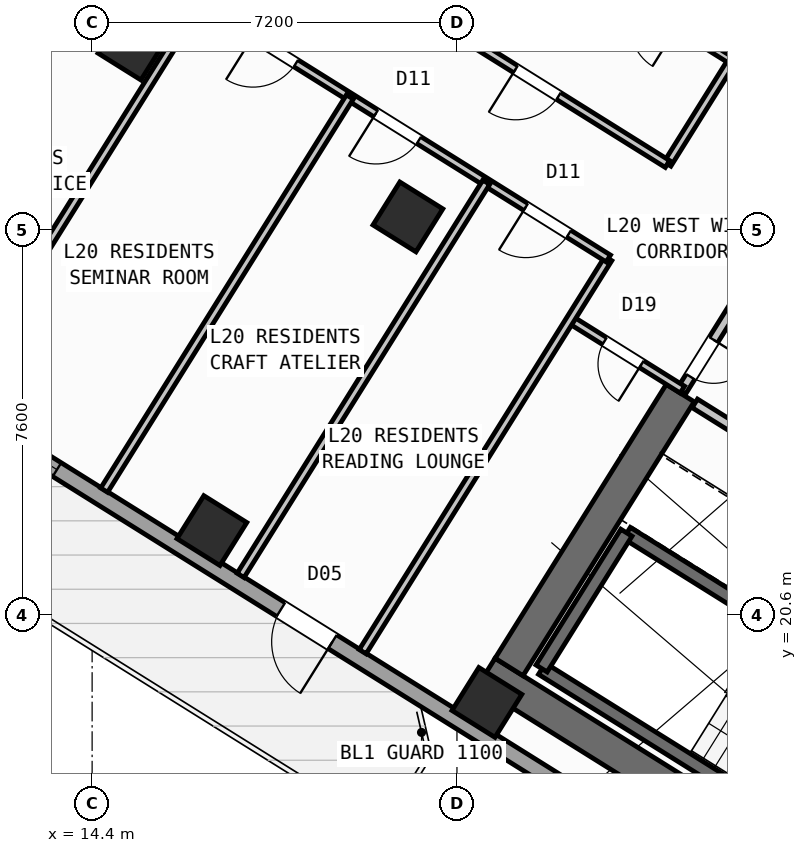
"""IFC4 building model, lengths in metres.
Left out: names, types, materials, properties, quantities, classifications, styles, units other than length and angle.
Written with IfcOpenShell. Run it as: python <this file> out.ifc"""

import sys

from ifc_helpers import new_model, si_unit, direction, frame, frame_2d, origin, origin_2d, place, context, subcontext, project, spatial, rectangle, hollow_rectangle, extrude, source, transform, mapped, element, fill, save


model = new_model("IFC4")
c1 = context("Model", 3, precision=1e-05, world=origin(), true_north=direction((0.0, 1.0)))
c2 = subcontext(c1, "Body", "Model", "MODEL_VIEW")
j1 = project(units=[si_unit("LENGTHUNIT", "METRE"), si_unit("PLANEANGLEUNIT", "RADIAN")], contexts=[c1])
p1 = place(None, origin())
s1 = spatial("IfcSite", under=j1, at=p1, CompositionType="ELEMENT")
p2 = place(p1, origin())
s2 = spatial("IfcBuilding", under=s1, at=p2, CompositionType="ELEMENT")
p3 = place(p2, frame((0.0, 0.0, 81.0)))
s3 = spatial("IfcBuildingStorey", under=s2, at=p3, CompositionType="ELEMENT", Elevation=81.0)
p4 = place(p3, frame((33.409, 12.45, 0.0), z_axis=(0.0, 0.0, 1.0), x_axis=(-0.848051132073, 0.529914405721, 0.0)))
e1 = element("IfcWall", 1, at=p4, inside=s3, PredefinedType="SHEAR", context=c2, shape_type="SweptSolid", body=[
    extrude(rectangle(XDim=13.24, YDim=0.65, at=frame_2d((6.62, 0.0))), origin(), (0.0, 0.0, 1.0), 3.32),
])
p5 = place(p3, frame((26.007, 24.976, 0.0), z_axis=(0.0, 0.0, 1.0), x_axis=(-0.529916319127, -0.848049936456, 0.0)))
e2 = element("IfcWall", 2, at=p5, inside=s3, PredefinedType="SHEAR", context=c2, shape_type="SweptSolid", body=[
    extrude(rectangle(XDim=6.375, YDim=0.65, at=frame_2d((3.188, 0.0))), origin(), (0.0, 0.0, 1.0), 3.32),
])
m1 = source(origin(), c2, "Body", "SweptSolid", [
    extrude(hollow_rectangle(XDim=1.0, YDim=1.0, WallThickness=0.04, at=origin_2d()), origin(), (0.0, 0.0, 1.0), 3.6),
])
for number, where, z_axis, x_axis in (
    (3, (22.191, 18.87, 0.0), (0.0, 0.0, 1.0), (-0.848, 0.53, 0.0)),
    (4, (20.632, 28.452, 0.0), (0.0, 0.0, 1.0), (-0.848, 0.53, 0.0)),
    (5, (16.764, 22.261, 0.0), (0.0, 0.0, 1.0), (-0.848, 0.53, 0.0)),
    (6, (15.205, 31.844, 0.0), (0.0, 0.0, 1.0), (-0.848, 0.53, 0.0)),
):
    element("IfcColumn", number, at=place(p3, frame(where, z_axis=z_axis, x_axis=x_axis)), inside=s3, PredefinedType="COLUMN", context=c2, shape_type="MappedRepresentation", body=[
        mapped(m1, transform((0.0, 0.0, 0.0), scale=1.0)),
    ])
p6 = place(p3, frame((31.76, 12.183, 0.0), z_axis=(0.0, 0.0, 1.0), x_axis=(-0.848047074256, 0.529920899612, 0.0)))
e7 = element("IfcWall", 7, at=p6, inside=s3, PredefinedType="STANDARD", context=c2, shape_type="SweptSolid", body=[
    extrude(rectangle(XDim=30.652, YDim=0.32, at=frame_2d((15.326, 0.0))), origin(), (0.0, 0.0, 1.0), 3.32),
])
p7 = place(p6, frame((14.878, 0.0, 0.0)))
e8 = element("IfcOpeningElement", 8, at=p7, cuts=e7, PredefinedType="OPENING", context=c2, shape_type="SweptSolid", body=[
    extrude(rectangle(XDim=1.2, YDim=2.15, at=frame_2d((0.6, 1.075))), frame((0.0, 0.17, 0.0), z_axis=(0.0, -1.0, 0.0), x_axis=(1.0, 0.0, 0.0)), (0.0, 0.0, 1.0), 0.34),
])
p8 = place(p6, frame((1.99, 0.0, 0.8)))
e9 = element("IfcOpeningElement", 9, at=p8, cuts=e7, PredefinedType="OPENING", context=c2, shape_type="SweptSolid", body=[
    extrude(rectangle(XDim=2.1, YDim=1.55, at=frame_2d((1.05, 0.775))), frame((0.0, 0.17, 0.0), z_axis=(0.0, -1.0, 0.0), x_axis=(1.0, 0.0, 0.0)), (0.0, 0.0, 1.0), 0.34),
])
p9 = place(p6, frame((7.169, 0.0, 0.8)))
e10 = element("IfcOpeningElement", 10, at=p9, cuts=e7, PredefinedType="OPENING", context=c2, shape_type="SweptSolid", body=[
    extrude(rectangle(XDim=2.1, YDim=1.55, at=frame_2d((1.05, 0.775))), frame((0.0, 0.17, 0.0), z_axis=(0.0, -1.0, 0.0), x_axis=(1.0, 0.0, 0.0)), (0.0, 0.0, 1.0), 0.34),
])
p10 = place(p6, frame((21.289, 0.0, 0.85)))
e11 = element("IfcOpeningElement", 11, at=p10, cuts=e7, PredefinedType="OPENING", context=c2, shape_type="SweptSolid", body=[
    extrude(rectangle(XDim=1.5, YDim=1.5, at=frame_2d((0.75, 0.75))), frame((0.0, 0.17, 0.0), z_axis=(0.0, -1.0, 0.0), x_axis=(1.0, 0.0, 0.0)), (0.0, 0.0, 1.0), 0.34),
])
p11 = place(p6, frame((25.59, 0.0, 1.0)))
e12 = element("IfcOpeningElement", 12, at=p11, cuts=e7, PredefinedType="OPENING", context=c2, shape_type="SweptSolid", body=[
    extrude(rectangle(XDim=0.9, YDim=1.25, at=frame_2d((0.45, 0.625))), frame((0.0, 0.17, 0.0), z_axis=(0.0, -1.0, 0.0), x_axis=(1.0, 0.0, 0.0)), (0.0, 0.0, 1.0), 0.34),
])
p12 = place(p6, frame((28.47, 0.0, 1.0)))
e13 = element("IfcOpeningElement", 13, at=p12, cuts=e7, PredefinedType="OPENING", context=c2, shape_type="SweptSolid", body=[
    extrude(rectangle(XDim=0.9, YDim=1.25, at=frame_2d((0.45, 0.625))), frame((0.0, 0.17, 0.0), z_axis=(0.0, -1.0, 0.0), x_axis=(1.0, 0.0, 0.0)), (0.0, 0.0, 1.0), 0.34),
])
p13 = place(p3, frame((5.7, 28.71, 0.0), z_axis=(0.0, 0.0, 1.0), x_axis=(0.529923711467, 0.8480453172, 0.0)))
e14 = element("IfcWall", 14, at=p13, inside=s3, PredefinedType="STANDARD", context=c2, shape_type="SweptSolid", body=[
    extrude(rectangle(XDim=21.587, YDim=0.32, at=frame_2d((10.794, 0.0))), origin(), (0.0, 0.0, 1.0), 2.745),
])
p14 = place(p13, frame((2.994, 0.0, 0.8)))
e15 = element("IfcOpeningElement", 15, at=p14, cuts=e14, PredefinedType="OPENING", context=c2, shape_type="SweptSolid", body=[
    extrude(rectangle(XDim=2.1, YDim=1.55, at=frame_2d((1.05, 0.775))), frame((0.0, 0.17, 0.0), z_axis=(0.0, -1.0, 0.0), x_axis=(1.0, 0.0, 0.0)), (0.0, 0.0, 1.0), 0.34),
])
p15 = place(p13, frame((12.049, 0.0, 1.0)))
e16 = element("IfcOpeningElement", 16, at=p15, cuts=e14, PredefinedType="OPENING", context=c2, shape_type="SweptSolid", body=[
    extrude(rectangle(XDim=0.9, YDim=1.25, at=frame_2d((0.45, 0.625))), frame((0.0, 0.17, 0.0), z_axis=(0.0, -1.0, 0.0), x_axis=(1.0, 0.0, 0.0)), (0.0, 0.0, 1.0), 0.34),
])
p16 = place(p13, frame((17.431, 0.0, 0.85)))
e17 = element("IfcOpeningElement", 17, at=p16, cuts=e14, PredefinedType="OPENING", context=c2, shape_type="SweptSolid", body=[
    extrude(rectangle(XDim=1.5, YDim=1.5, at=frame_2d((0.75, 0.75))), frame((0.0, 0.17, 0.0), z_axis=(0.0, -1.0, 0.0), x_axis=(1.0, 0.0, 0.0)), (0.0, 0.0, 1.0), 0.34),
])
p17 = place(p3, frame((17.424, 47.083, 0.0), z_axis=(0.0, 0.0, 1.0), x_axis=(0.848049927979, -0.529916332693, 0.0)))
e18 = element("IfcWall", 18, at=p17, inside=s3, PredefinedType="STANDARD", context=c2, shape_type="SweptSolid", body=[
    extrude(rectangle(XDim=29.223, YDim=0.32, at=frame_2d((14.612, 0.0))), origin(), (0.0, 0.0, 1.0), 3.32),
])
p18 = place(p17, frame((3.709, 0.0, 0.0)))
e19 = element("IfcOpeningElement", 19, at=p18, cuts=e18, PredefinedType="OPENING", context=c2, shape_type="SweptSolid", body=[
    extrude(rectangle(XDim=1.05, YDim=2.15, at=frame_2d((0.525, 1.075))), frame((0.0, 0.17, 0.0), z_axis=(0.0, -1.0, 0.0), x_axis=(1.0, 0.0, 0.0)), (0.0, 0.0, 1.0), 0.34),
])
p19 = place(p17, frame((0.659, 0.0, 0.95)))
e20 = element("IfcOpeningElement", 20, at=p19, cuts=e18, PredefinedType="OPENING", context=c2, shape_type="SweptSolid", body=[
    extrude(rectangle(XDim=1.2, YDim=1.4, at=frame_2d((0.6, 0.7))), frame((0.0, 0.17, 0.0), z_axis=(0.0, -1.0, 0.0), x_axis=(1.0, 0.0, 0.0)), (0.0, 0.0, 1.0), 0.34),
])
p20 = place(p17, frame((7.369, 0.0, 0.85)))
e21 = element("IfcOpeningElement", 21, at=p20, cuts=e18, PredefinedType="OPENING", context=c2, shape_type="SweptSolid", body=[
    extrude(rectangle(XDim=1.8, YDim=1.5, at=frame_2d((0.9, 0.75))), frame((0.0, 0.17, 0.0), z_axis=(0.0, -1.0, 0.0), x_axis=(1.0, 0.0, 0.0)), (0.0, 0.0, 1.0), 0.34),
])
p21 = place(p17, frame((11.009, 0.0, 1.0)))
e22 = element("IfcOpeningElement", 22, at=p21, cuts=e18, PredefinedType="OPENING", context=c2, shape_type="SweptSolid", body=[
    extrude(rectangle(XDim=0.9, YDim=1.25, at=frame_2d((0.45, 0.625))), frame((0.0, 0.17, 0.0), z_axis=(0.0, -1.0, 0.0), x_axis=(1.0, 0.0, 0.0)), (0.0, 0.0, 1.0), 0.34),
])
p22 = place(p17, frame((13.874, 0.0, 0.95)))
e23 = element("IfcOpeningElement", 23, at=p22, cuts=e18, PredefinedType="OPENING", context=c2, shape_type="SweptSolid", body=[
    extrude(rectangle(XDim=1.2, YDim=1.4, at=frame_2d((0.6, 0.7))), frame((0.0, 0.17, 0.0), z_axis=(0.0, -1.0, 0.0), x_axis=(1.0, 0.0, 0.0)), (0.0, 0.0, 1.0), 0.34),
])
p23 = place(p17, frame((17.254, 0.0, 1.0)))
e24 = element("IfcOpeningElement", 24, at=p23, cuts=e18, PredefinedType="OPENING", context=c2, shape_type="SweptSolid", body=[
    extrude(rectangle(XDim=0.9, YDim=1.25, at=frame_2d((0.45, 0.625))), frame((0.0, 0.17, 0.0), z_axis=(0.0, -1.0, 0.0), x_axis=(1.0, 0.0, 0.0)), (0.0, 0.0, 1.0), 0.34),
])
p24 = place(p17, frame((20.764, 0.0, 0.8)))
e25 = element("IfcOpeningElement", 25, at=p24, cuts=e18, PredefinedType="OPENING", context=c2, shape_type="SweptSolid", body=[
    extrude(rectangle(XDim=2.1, YDim=1.55, at=frame_2d((1.05, 0.775))), frame((0.0, 0.17, 0.0), z_axis=(0.0, -1.0, 0.0), x_axis=(1.0, 0.0, 0.0)), (0.0, 0.0, 1.0), 0.34),
])
p25 = place(p17, frame((25.403, 0.0, 0.8)))
e26 = element("IfcOpeningElement", 26, at=p25, cuts=e18, PredefinedType="OPENING", context=c2, shape_type="SweptSolid", body=[
    extrude(rectangle(XDim=2.1, YDim=1.55, at=frame_2d((1.05, 0.775))), frame((0.0, 0.17, 0.0), z_axis=(0.0, -1.0, 0.0), x_axis=(1.0, 0.0, 0.0)), (0.0, 0.0, 1.0), 0.34),
])
p26 = place(p3, frame((29.605, 15.581, 0.0), z_axis=(0.0, 0.0, 1.0), x_axis=(-0.848036911448, 0.529937163087, 0.0)))
e27 = element("IfcWall", 27, at=p26, inside=s3, PredefinedType="SHEAR", context=c2, shape_type="SweptSolid", body=[
    extrude(rectangle(XDim=7.46, YDim=0.26, at=frame_2d((3.73, 0.0))), origin(), (0.0, 0.0, 1.0), 3.32),
])
p27 = place(p3, frame((31.28, 18.261, 0.0), z_axis=(0.0, 0.0, 1.0), x_axis=(-0.848051618787, 0.529913626805, 0.0)))
e28 = element("IfcWall", 28, at=p27, inside=s3, PredefinedType="SHEAR", context=c2, shape_type="SweptSolid", body=[
    extrude(rectangle(XDim=7.46, YDim=0.26, at=frame_2d((3.73, 0.0))), origin(), (0.0, 0.0, 1.0), 3.32),
])
p28 = place(p27, frame((0.36, 0.0, 0.0)))
e29 = element("IfcOpeningElement", 29, at=p28, cuts=e28, PredefinedType="OPENING", context=c2, shape_type="SweptSolid", body=[
    extrude(rectangle(XDim=0.86, YDim=2.05, at=frame_2d((0.43, 1.025))), frame((0.0, 0.14, 0.0), z_axis=(0.0, -1.0, 0.0), x_axis=(1.0, 0.0, 0.0)), (0.0, 0.0, 1.0), 0.28),
])
p29 = place(p3, frame((24.945, 22.22, 0.0), z_axis=(0.0, 0.0, 1.0), x_axis=(-0.529908658664, -0.84805472316, 0.0)))
e30 = element("IfcWall", 30, at=p29, inside=s3, PredefinedType="SHEAR", context=c2, shape_type="SweptSolid", body=[
    extrude(rectangle(XDim=3.16, YDim=0.26, at=frame_2d((1.58, 0.0))), origin(), (0.0, 0.0, 1.0), 3.32),
])
p30 = place(p3, frame((31.525, 21.504, 0.0), z_axis=(0.0, 0.0, 1.0), x_axis=(-0.848044998614, 0.529924221305, 0.0)))
e31 = element("IfcWall", 31, at=p30, inside=s3, PredefinedType="STANDARD", context=c2, shape_type="SweptSolid", body=[
    extrude(rectangle(XDim=6.168, YDim=0.2, at=frame_2d((3.084, 0.0))), origin(), (0.0, 0.0, 1.0), 3.31),
])
p31 = place(p30, frame((4.4, 0.0, 0.0)))
e32 = element("IfcOpeningElement", 32, at=p31, cuts=e31, PredefinedType="OPENING", context=c2, shape_type="SweptSolid", body=[
    extrude(rectangle(XDim=0.86, YDim=2.05, at=frame_2d((0.43, 1.025))), frame((0.0, 0.11, 0.0), z_axis=(0.0, -1.0, 0.0), x_axis=(1.0, 0.0, 0.0)), (0.0, 0.0, 1.0), 0.22),
])
p32 = place(p30, frame((1.45, 0.0, 0.0)))
e33 = element("IfcOpeningElement", 33, at=p32, cuts=e31, PredefinedType="OPENING", context=c2, shape_type="SweptSolid", body=[
    extrude(rectangle(XDim=0.86, YDim=2.05, at=frame_2d((0.43, 1.025))), frame((0.0, 0.11, 0.0), z_axis=(0.0, -1.0, 0.0), x_axis=(1.0, 0.0, 0.0)), (0.0, 0.0, 1.0), 0.22),
])
p33 = place(p3, frame((27.596, 27.52, 0.0), z_axis=(0.0, 0.0, 1.0), x_axis=(-0.529865479138, -0.848081702443, 0.0)))
e34 = element("IfcWall", 34, at=p33, inside=s3, PredefinedType="STANDARD", context=c2, shape_type="SweptSolid", body=[
    extrude(rectangle(XDim=2.96, YDim=0.2, at=frame_2d((1.48, 0.0))), origin(), (0.0, 0.0, 1.0), 3.31),
])
p34 = place(p33, frame((1.76, 0.0, 0.0)))
e35 = element("IfcOpeningElement", 35, at=p34, cuts=e34, PredefinedType="OPENING", context=c2, shape_type="SweptSolid", body=[
    extrude(rectangle(XDim=0.86, YDim=2.05, at=frame_2d((0.43, 1.025))), frame((0.0, 0.11, 0.0), z_axis=(0.0, -1.0, 0.0), x_axis=(1.0, 0.0, 0.0)), (0.0, 0.0, 1.0), 0.22),
])
p35 = place(p3, frame((26.049, 25.044, 0.0), z_axis=(0.0, 0.0, 1.0), x_axis=(-0.848050851465, 0.529914854792, 0.0)))
e36 = element("IfcWall", 36, at=p35, inside=s3, PredefinedType="PARTITIONING", context=c2, shape_type="SweptSolid", body=[
    extrude(rectangle(XDim=2.61, YDim=0.16, at=frame_2d((1.305, 0.0))), origin(), (0.0, 0.0, 1.0), 2.745),
])
p36 = place(p35, frame((0.95, 0.0, 0.0)))
e37 = element("IfcOpeningElement", 37, at=p36, cuts=e36, PredefinedType="OPENING", context=c2, shape_type="SweptSolid", body=[
    extrude(rectangle(XDim=0.86, YDim=2.05, at=frame_2d((0.43, 1.025))), frame((0.0, 0.09, 0.0), z_axis=(0.0, -1.0, 0.0), x_axis=(1.0, 0.0, 0.0)), (0.0, 0.0, 1.0), 0.18),
])
p37 = place(p3, frame((31.239, 38.274, 0.0), z_axis=(0.0, 0.0, 1.0), x_axis=(-0.529914125013, -0.848051307476, 0.0)))
e38 = element("IfcWall", 38, at=p37, inside=s3, PredefinedType="PARTITIONING", context=c2, shape_type="SweptSolid", body=[
    extrude(rectangle(XDim=10.35, YDim=0.16, at=frame_2d((5.175, 0.0))), origin(), (0.0, 0.0, 1.0), 3.31),
])
p38 = place(p3, frame((24.588, 27.631, 0.0), z_axis=(0.0, 0.0, 1.0), x_axis=(-0.529914992377, -0.848050765494, 0.0)))
e39 = element("IfcWall", 39, at=p38, inside=s3, PredefinedType="PARTITIONING", context=c2, shape_type="SweptSolid", body=[
    extrude(rectangle(XDim=9.15, YDim=0.16, at=frame_2d((4.575, 0.0))), origin(), (0.0, 0.0, 1.0), 3.31),
])
p39 = place(p3, frame((25.754, 29.497, 0.0), z_axis=(0.0, 0.0, 1.0), x_axis=(-0.848045850158, 0.529922858565, 0.0)))
e40 = element("IfcWall", 40, at=p39, inside=s3, PredefinedType="PARTITIONING", context=c2, shape_type="SweptSolid", body=[
    extrude(rectangle(XDim=16.73, YDim=0.16, at=frame_2d((8.365, 0.0))), origin(), (0.0, 0.0, 1.0), 3.31),
])
p40 = place(p39, frame((2.532, 0.0, 0.0)))
e41 = element("IfcOpeningElement", 41, at=p40, cuts=e40, PredefinedType="OPENING", context=c2, shape_type="SweptSolid", body=[
    extrude(rectangle(XDim=1.0, YDim=2.1, at=frame_2d((0.5, 1.05))), frame((0.0, 0.09, 0.0), z_axis=(0.0, -1.0, 0.0), x_axis=(1.0, 0.0, 0.0)), (0.0, 0.0, 1.0), 0.18),
])
p41 = place(p39, frame((14.76, 0.0, 0.0)))
e42 = element("IfcOpeningElement", 42, at=p41, cuts=e40, PredefinedType="OPENING", context=c2, shape_type="SweptSolid", body=[
    extrude(rectangle(XDim=1.0, YDim=2.1, at=frame_2d((0.5, 1.05))), frame((0.0, 0.09, 0.0), z_axis=(0.0, -1.0, 0.0), x_axis=(1.0, 0.0, 0.0)), (0.0, 0.0, 1.0), 0.18),
])
p42 = place(p3, frame((24.588, 27.631, 0.0), z_axis=(0.0, 0.0, 1.0), x_axis=(-0.848041752158, 0.529929416617, 0.0)))
e43 = element("IfcWall", 43, at=p42, inside=s3, PredefinedType="PARTITIONING", context=c2, shape_type="SweptSolid", body=[
    extrude(rectangle(XDim=16.73, YDim=0.16, at=frame_2d((8.365, 0.0))), origin(), (0.0, 0.0, 1.0), 3.31),
])
p43 = place(p42, frame((0.92, 0.0, 0.0)))
e44 = element("IfcOpeningElement", 44, at=p43, cuts=e43, PredefinedType="OPENING", context=c2, shape_type="SweptSolid", body=[
    extrude(rectangle(XDim=1.0, YDim=2.1, at=frame_2d((0.5, 1.05))), frame((0.0, 0.09, 0.0), z_axis=(0.0, -1.0, 0.0), x_axis=(1.0, 0.0, 0.0)), (0.0, 0.0, 1.0), 0.18),
])
p44 = place(p42, frame((4.408, 0.0, 0.0)))
e45 = element("IfcOpeningElement", 45, at=p44, cuts=e43, PredefinedType="OPENING", context=c2, shape_type="SweptSolid", body=[
    extrude(rectangle(XDim=1.0, YDim=2.1, at=frame_2d((0.5, 1.05))), frame((0.0, 0.09, 0.0), z_axis=(0.0, -1.0, 0.0), x_axis=(1.0, 0.0, 0.0)), (0.0, 0.0, 1.0), 0.18),
])
p45 = place(p42, frame((7.271, 0.0, 0.0)))
e46 = element("IfcOpeningElement", 46, at=p45, cuts=e43, PredefinedType="OPENING", context=c2, shape_type="SweptSolid", body=[
    extrude(rectangle(XDim=1.0, YDim=2.1, at=frame_2d((0.5, 1.05))), frame((0.0, 0.09, 0.0), z_axis=(0.0, -1.0, 0.0), x_axis=(1.0, 0.0, 0.0)), (0.0, 0.0, 1.0), 0.18),
])
p46 = place(p42, frame((10.78, 0.0, 0.0)))
e47 = element("IfcOpeningElement", 47, at=p46, cuts=e43, PredefinedType="OPENING", context=c2, shape_type="SweptSolid", body=[
    extrude(rectangle(XDim=1.0, YDim=2.1, at=frame_2d((0.5, 1.05))), frame((0.0, 0.09, 0.0), z_axis=(0.0, -1.0, 0.0), x_axis=(1.0, 0.0, 0.0)), (0.0, 0.0, 1.0), 0.18),
])
p47 = place(p42, frame((14.372, 0.0, 0.0)))
e48 = element("IfcOpeningElement", 48, at=p47, cuts=e43, PredefinedType="OPENING", context=c2, shape_type="SweptSolid", body=[
    extrude(rectangle(XDim=1.0, YDim=2.1, at=frame_2d((0.5, 1.05))), frame((0.0, 0.09, 0.0), z_axis=(0.0, -1.0, 0.0), x_axis=(1.0, 0.0, 0.0)), (0.0, 0.0, 1.0), 0.18),
])
p48 = place(p3, frame((22.179, 29.136, 0.0), z_axis=(0.0, 0.0, 1.0), x_axis=(-0.529922190913, -0.848046267357, 0.0)))
e49 = element("IfcWall", 49, at=p48, inside=s3, PredefinedType="PARTITIONING", context=c2, shape_type="SweptSolid", body=[
    extrude(rectangle(XDim=9.15, YDim=0.16, at=frame_2d((4.575, 0.0))), origin(), (0.0, 0.0, 1.0), 3.31),
])
p49 = place(p3, frame((19.486, 30.819, 0.0), z_axis=(0.0, 0.0, 1.0), x_axis=(-0.529914992377, -0.848050765494, 0.0)))
e50 = element("IfcWall", 50, at=p49, inside=s3, PredefinedType="PARTITIONING", context=c2, shape_type="SweptSolid", body=[
    extrude(rectangle(XDim=9.15, YDim=0.16, at=frame_2d((4.575, 0.0))), origin(), (0.0, 0.0, 1.0), 2.935),
])
p50 = place(p3, frame((16.51, 32.678, 0.0), z_axis=(0.0, 0.0, 1.0), x_axis=(-0.529903001606, -0.848058257957, 0.0)))
e51 = element("IfcWall", 51, at=p50, inside=s3, PredefinedType="PARTITIONING", context=c2, shape_type="SweptSolid", body=[
    extrude(rectangle(XDim=9.15, YDim=0.16, at=frame_2d((4.575, 0.0))), origin(), (0.0, 0.0, 1.0), 3.31),
])
p51 = place(p3, frame((27.026, 31.532, 0.0), z_axis=(0.0, 0.0, 1.0), x_axis=(-0.8480503147, 0.529915713804, 0.0)))
e52 = element("IfcWall", 52, at=p51, inside=s3, PredefinedType="PLUMBINGWALL", context=c2, shape_type="SweptSolid", body=[
    extrude(rectangle(XDim=6.065, YDim=0.14, at=frame_2d((3.032, 0.0))), origin(), (0.0, 0.0, 1.0), 3.31),
])
p52 = place(p51, frame((1.272, 0.0, 0.0)))
e53 = element("IfcOpeningElement", 53, at=p52, cuts=e52, PredefinedType="OPENING", context=c2, shape_type="SweptSolid", body=[
    extrude(rectangle(XDim=0.92, YDim=2.08, at=frame_2d((0.46, 1.04))), frame((0.0, 0.08, 0.0), z_axis=(0.0, -1.0, 0.0), x_axis=(1.0, 0.0, 0.0)), (0.0, 0.0, 1.0), 0.16),
])
m2 = source(origin(), c2, "Body", "SweptSolid", [
    extrude(rectangle(XDim=1.2, YDim=2.15, at=frame_2d((0.6, 1.075))), frame((0.0, 0.025, 0.0), z_axis=(0.0, -1.0, 0.0), x_axis=(1.0, 0.0, 0.0)), (0.0, 0.0, 1.0), 0.05),
])
p53 = place(p7, origin())
e54 = element("IfcDoor", 54, at=p53, inside=s3, OperationType="SINGLE_SWING_LEFT", PredefinedType="DOOR", context=c2, shape_type="MappedRepresentation", body=[
    mapped(m2, transform((0.0, 0.0, 0.0), scale=1.0)),
])
fill(e8, e54)
m3 = source(origin(), c2, "Body", "SweptSolid", [
    extrude(rectangle(XDim=1.5, YDim=1.5, at=frame_2d((0.75, 0.75))), frame((0.0, 0.03, 0.0), z_axis=(0.0, -1.0, 0.0), x_axis=(1.0, 0.0, 0.0)), (0.0, 0.0, 1.0), 0.06),
])
p54 = place(p10, origin())
e55 = element("IfcWindow", 55, at=p54, inside=s3, PartitioningType="SINGLE_PANEL", PredefinedType="WINDOW", context=c2, shape_type="MappedRepresentation", body=[
    mapped(m3, transform((0.0, 0.0, 0.0), scale=1.0)),
])
fill(e11, e55)
m4 = source(origin(), c2, "Body", "SweptSolid", [
    extrude(rectangle(XDim=0.86, YDim=2.05, at=frame_2d((0.43, 1.025))), frame((0.0, 0.025, 0.0), z_axis=(0.0, -1.0, 0.0), x_axis=(1.0, 0.0, 0.0)), (0.0, 0.0, 1.0), 0.05),
])
p55 = place(p36, origin())
e56 = element("IfcDoor", 56, at=p55, inside=s3, OperationType="SINGLE_SWING_LEFT", PredefinedType="DOOR", context=c2, shape_type="MappedRepresentation", body=[
    mapped(m4, transform((0.0, 0.0, 0.0), scale=1.0)),
])
fill(e37, e56)
p56 = place(p34, origin())
e57 = element("IfcDoor", 57, at=p56, inside=s3, OperationType="SINGLE_SWING_LEFT", PredefinedType="DOOR", context=c2, shape_type="MappedRepresentation", body=[
    mapped(m4, transform((0.0, 0.0, 0.0), scale=1.0)),
])
fill(e35, e57)
m5 = source(origin(), c2, "Body", "SweptSolid", [
    extrude(rectangle(XDim=1.0, YDim=2.1, at=frame_2d((0.5, 1.05))), frame((0.0, 0.025, 0.0), z_axis=(0.0, -1.0, 0.0), x_axis=(1.0, 0.0, 0.0)), (0.0, 0.0, 1.0), 0.05),
])
p57 = place(p43, origin())
e58 = element("IfcDoor", 58, at=p57, inside=s3, OperationType="SINGLE_SWING_RIGHT", PredefinedType="DOOR", context=c2, shape_type="MappedRepresentation", body=[
    mapped(m5, transform((0.0, 0.0, 0.0), scale=1.0)),
])
fill(e44, e58)
p58 = place(p44, origin())
e59 = element("IfcDoor", 59, at=p58, inside=s3, OperationType="SINGLE_SWING_RIGHT", PredefinedType="DOOR", context=c2, shape_type="MappedRepresentation", body=[
    mapped(m5, transform((0.0, 0.0, 0.0), scale=1.0)),
])
fill(e45, e59)
p59 = place(p45, origin())
e60 = element("IfcDoor", 60, at=p59, inside=s3, OperationType="SINGLE_SWING_RIGHT", PredefinedType="DOOR", context=c2, shape_type="MappedRepresentation", body=[
    mapped(m5, transform((0.0, 0.0, 0.0), scale=1.0)),
])
fill(e46, e60)
p60 = place(p40, origin())
e61 = element("IfcDoor", 61, at=p60, inside=s3, OperationType="SINGLE_SWING_RIGHT", PredefinedType="DOOR", context=c2, shape_type="MappedRepresentation", body=[
    mapped(m5, transform((0.0, 0.0, 0.0), scale=1.0)),
])
fill(e41, e61)
save(model, sys.argv[1])
